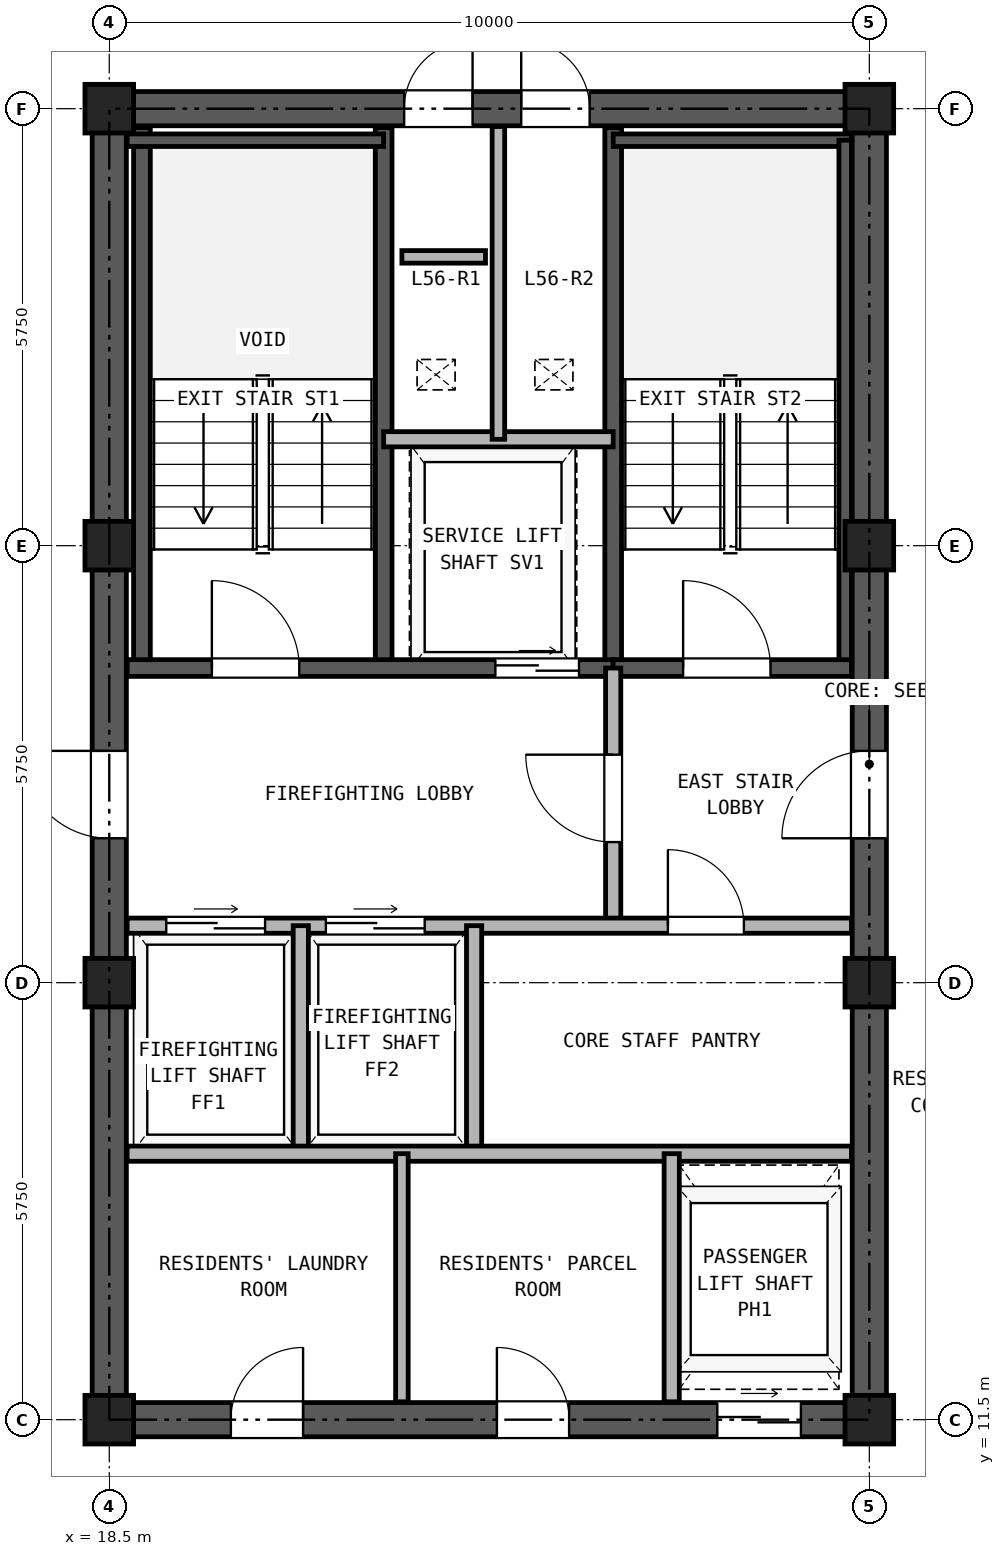
"""IFC4 building model, lengths in metres.
Left out: names, types, materials, properties, quantities, classifications, styles, units other than length and angle.
Written with IfcOpenShell. Run it as: python <this file> out.ifc"""

import sys

from ifc_helpers import new_model, si_unit, direction, frame, frame_2d, origin, origin_2d, place, context, subcontext, project, spatial, rectangle, hollow_rectangle, extrude, source, transform, mapped, element, fill, save


model = new_model("IFC4")
c1 = context("Model", 3, precision=1e-05, world=origin(), true_north=direction((0.0, 1.0)))
c2 = subcontext(c1, "Body", "Model", "MODEL_VIEW")
j1 = project(units=[si_unit("LENGTHUNIT", "METRE"), si_unit("PLANEANGLEUNIT", "RADIAN")], contexts=[c1])
p1 = place(None, origin())
s1 = spatial("IfcSite", under=j1, at=p1, CompositionType="ELEMENT")
p2 = place(p1, origin())
s2 = spatial("IfcBuilding", under=s1, at=p2, CompositionType="ELEMENT")
p3 = place(p2, frame((0.0, 0.0, 199.6)))
s3 = spatial("IfcBuildingStorey", under=s2, at=p3, CompositionType="ELEMENT", Elevation=199.6)
m1 = source(origin(), c2, "Body", "SweptSolid", [
    extrude(hollow_rectangle(XDim=0.64, YDim=0.64, WallThickness=0.035, at=origin_2d()), origin(), (0.0, 0.0, 1.0), 2.95),
])
for number, where, z_axis, x_axis in (
    (1, (18.5, 11.5, 0.0), (0.0, 0.0, 1.0), (1.0, 0.0, 0.0)),
    (2, (18.5, 17.25, 0.0), (0.0, 0.0, 1.0), (1.0, 0.0, 0.0)),
    (3, (18.5, 23.0, 0.0), (0.0, 0.0, 1.0), (1.0, 0.0, 0.0)),
    (4, (18.5, 28.75, 0.0), (0.0, 0.0, 1.0), (1.0, 0.0, 0.0)),
    (5, (28.5, 11.5, 0.0), (0.0, 0.0, 1.0), (1.0, 0.0, 0.0)),
    (6, (28.5, 17.25, 0.0), (0.0, 0.0, 1.0), (1.0, 0.0, 0.0)),
    (7, (28.5, 23.0, 0.0), (0.0, 0.0, 1.0), (1.0, 0.0, 0.0)),
    (8, (28.5, 28.75, 0.0), (0.0, 0.0, 1.0), (1.0, 0.0, 0.0)),
):
    element("IfcColumn", number, at=place(p3, frame(where, z_axis=z_axis, x_axis=x_axis)), inside=s3, PredefinedType="COLUMN", context=c2, shape_type="MappedRepresentation", body=[
        mapped(m1, transform((0.0, 0.0, 0.0), x_axis=(1.0, 0.0, 0.0), y_axis=(0.0, 1.0, 0.0), z_axis=(0.0, 0.0, 1.0), scale=1.0)),
    ])
p4 = place(p3, frame((18.275, 11.5, 0.0), z_axis=(0.0, 0.0, 1.0), x_axis=(1.0, 0.0, 0.0)))
e9 = element("IfcWall", 9, at=p4, inside=s3, PredefinedType="SHEAR", context=c2, shape_type="SweptSolid", body=[
    extrude(rectangle(XDim=10.45, YDim=0.45, at=frame_2d((5.225, 0.0))), origin(), (0.0, 0.0, 1.0), 2.95),
])
p5 = place(p4, frame((1.825, 0.0, 0.0)))
e10 = element("IfcOpeningElement", 10, at=p5, cuts=e9, PredefinedType="OPENING", context=c2, shape_type="SweptSolid", body=[
    extrude(rectangle(XDim=0.95, YDim=2.15, at=frame_2d((0.475, 1.075))), frame((0.0, 0.235, 0.0), z_axis=(0.0, -1.0, 0.0), x_axis=(1.0, 0.0, 0.0)), (0.0, 0.0, 1.0), 0.47),
])
p6 = place(p4, frame((5.325, 0.0, 0.0)))
e11 = element("IfcOpeningElement", 11, at=p6, cuts=e9, PredefinedType="OPENING", context=c2, shape_type="SweptSolid", body=[
    extrude(rectangle(XDim=0.95, YDim=2.15, at=frame_2d((0.475, 1.075))), frame((0.0, 0.235, 0.0), z_axis=(0.0, -1.0, 0.0), x_axis=(1.0, 0.0, 0.0)), (0.0, 0.0, 1.0), 0.47),
])
p7 = place(p4, frame((8.225, 0.0, 0.0)))
e12 = element("IfcOpeningElement", 12, at=p7, cuts=e9, PredefinedType="OPENING", context=c2, shape_type="SweptSolid", body=[
    extrude(rectangle(XDim=1.1, YDim=2.25, at=frame_2d((0.55, 1.125))), frame((0.0, 0.235, 0.0), z_axis=(0.0, -1.0, 0.0), x_axis=(1.0, 0.0, 0.0)), (0.0, 0.0, 1.0), 0.47),
])
p8 = place(p3, frame((18.275, 28.75, 0.0), z_axis=(0.0, 0.0, 1.0), x_axis=(1.0, 0.0, 0.0)))
e13 = element("IfcWall", 13, at=p8, inside=s3, PredefinedType="SHEAR", context=c2, shape_type="SweptSolid", body=[
    extrude(rectangle(XDim=10.45, YDim=0.45, at=frame_2d((5.225, 0.0))), origin(), (0.0, 0.0, 1.0), 2.95),
])
p9 = place(p8, frame((4.105, 0.0, 0.0)))
e14 = element("IfcOpeningElement", 14, at=p9, cuts=e13, PredefinedType="OPENING", context=c2, shape_type="SweptSolid", body=[
    extrude(rectangle(XDim=0.9, YDim=2.05, at=frame_2d((0.45, 1.025))), frame((0.0, 0.235, 0.0), z_axis=(0.0, -1.0, 0.0), x_axis=(1.0, 0.0, 0.0)), (0.0, 0.0, 1.0), 0.47),
])
p10 = place(p8, frame((5.645, 0.0, 0.0)))
e15 = element("IfcOpeningElement", 15, at=p10, cuts=e13, PredefinedType="OPENING", context=c2, shape_type="SweptSolid", body=[
    extrude(rectangle(XDim=0.9, YDim=2.05, at=frame_2d((0.45, 1.025))), frame((0.0, 0.235, 0.0), z_axis=(0.0, -1.0, 0.0), x_axis=(1.0, 0.0, 0.0)), (0.0, 0.0, 1.0), 0.47),
])
p11 = place(p3, frame((18.5, 11.725, 0.0), z_axis=(0.0, 0.0, 1.0), x_axis=(0.0, 1.0, 0.0)))
e16 = element("IfcWall", 16, at=p11, inside=s3, PredefinedType="SHEAR", context=c2, shape_type="SweptSolid", body=[
    extrude(rectangle(XDim=16.8, YDim=0.45, at=frame_2d((8.4, 0.0))), origin(), (0.0, 0.0, 1.0), 2.95),
])
p12 = place(p11, frame((7.425, 0.0, 0.0)))
e17 = element("IfcOpeningElement", 17, at=p12, cuts=e16, PredefinedType="OPENING", context=c2, shape_type="SweptSolid", body=[
    extrude(rectangle(XDim=1.15, YDim=2.2, at=frame_2d((0.575, 1.1))), frame((0.0, 0.235, 0.0), z_axis=(0.0, -1.0, 0.0), x_axis=(1.0, 0.0, 0.0)), (0.0, 0.0, 1.0), 0.47),
])
p13 = place(p3, frame((28.5, 11.725, 0.0), z_axis=(0.0, 0.0, 1.0), x_axis=(0.0, 1.0, 0.0)))
e18 = element("IfcWall", 18, at=p13, inside=s3, PredefinedType="SHEAR", context=c2, shape_type="SweptSolid", body=[
    extrude(rectangle(XDim=16.8, YDim=0.45, at=frame_2d((8.4, 0.0))), origin(), (0.0, 0.0, 1.0), 2.95),
])
p14 = place(p13, frame((7.425, 0.0, 0.0)))
e19 = element("IfcOpeningElement", 19, at=p14, cuts=e18, PredefinedType="OPENING", context=c2, shape_type="SweptSolid", body=[
    extrude(rectangle(XDim=1.15, YDim=2.2, at=frame_2d((0.575, 1.1))), frame((0.0, 0.235, 0.0), z_axis=(0.0, -1.0, 0.0), x_axis=(1.0, 0.0, 0.0)), (0.0, 0.0, 1.0), 0.47),
])
for number, where, z_axis, x_axis in (
    (20, (18.93, 21.39, 0.0), (0.0, 0.0, 1.0), (0.0, 1.0, 0.0)),
    (21, (22.11, 21.39, 0.0), (0.0, 0.0, 1.0), (0.0, 1.0, 0.0)),
    (22, (25.13, 21.39, 0.0), (0.0, 0.0, 1.0), (0.0, 1.0, 0.0)),
):
    element("IfcWall", number, at=place(p3, frame(where, z_axis=z_axis, x_axis=x_axis)), inside=s3, PredefinedType="SOLIDWALL", context=c2, shape_type="SweptSolid", body=[
        extrude(rectangle(XDim=7.11, YDim=0.22, at=frame_2d((3.555, 0.0))), origin(), (0.0, 0.0, 1.0), 2.95),
    ])
p15 = place(p3, frame((18.735, 28.335, 0.0), z_axis=(0.0, 0.0, 1.0), x_axis=(1.0, 0.0, 0.0)))
e23 = element("IfcWall", 23, at=p15, inside=s3, PredefinedType="PARTITIONING", context=c2, shape_type="SweptSolid", body=[
    extrude(rectangle(XDim=3.375, YDim=0.165, at=frame_2d((1.688, 0.0))), origin(), (0.0, 0.0, 1.0), 2.95),
])
p16 = place(p3, frame((25.13, 28.335, 0.0), z_axis=(0.0, 0.0, 1.0), x_axis=(1.0, 0.0, 0.0)))
e24 = element("IfcWall", 24, at=p16, inside=s3, PredefinedType="PARTITIONING", context=c2, shape_type="SweptSolid", body=[
    extrude(rectangle(XDim=3.135, YDim=0.165, at=frame_2d((1.567, 0.0))), origin(), (0.0, 0.0, 1.0), 2.95),
])
p17 = place(p3, frame((28.183, 21.39, 0.0), z_axis=(0.0, 0.0, 1.0), x_axis=(0.0, 1.0, 0.0)))
e25 = element("IfcWall", 25, at=p17, inside=s3, PredefinedType="PARTITIONING", context=c2, shape_type="SweptSolid", body=[
    extrude(rectangle(XDim=6.945, YDim=0.165, at=frame_2d((3.473, 0.0))), origin(), (0.0, 0.0, 1.0), 2.95),
])
p18 = place(p3, frame((18.735, 21.39, 0.0), z_axis=(0.0, 0.0, 1.0), x_axis=(1.0, 0.0, 0.0)))
e26 = element("IfcWall", 26, at=p18, inside=s3, PredefinedType="SOLIDWALL", context=c2, shape_type="SweptSolid", body=[
    extrude(rectangle(XDim=6.395, YDim=0.22, at=frame_2d((3.197, 0.0))), origin(), (0.0, 0.0, 1.0), 2.95),
])
p19 = place(p18, frame((1.115, 0.0, 0.0)))
e27 = element("IfcOpeningElement", 27, at=p19, cuts=e26, PredefinedType="OPENING", context=c2, shape_type="SweptSolid", body=[
    extrude(rectangle(XDim=1.15, YDim=2.2, at=frame_2d((0.575, 1.1))), frame((0.0, 0.12, 0.0), z_axis=(0.0, -1.0, 0.0), x_axis=(1.0, 0.0, 0.0)), (0.0, 0.0, 1.0), 0.24),
])
p20 = place(p18, frame((4.845, 0.0, 0.0)))
e28 = element("IfcOpeningElement", 28, at=p20, cuts=e26, PredefinedType="OPENING", context=c2, shape_type="SweptSolid", body=[
    extrude(rectangle(XDim=1.1, YDim=2.25, at=frame_2d((0.55, 1.125))), frame((0.0, 0.12, 0.0), z_axis=(0.0, -1.0, 0.0), x_axis=(1.0, 0.0, 0.0)), (0.0, 0.0, 1.0), 0.24),
])
p21 = place(p3, frame((25.13, 21.39, 0.0), z_axis=(0.0, 0.0, 1.0), x_axis=(1.0, 0.0, 0.0)))
e29 = element("IfcWall", 29, at=p21, inside=s3, PredefinedType="SOLIDWALL", context=c2, shape_type="SweptSolid", body=[
    extrude(rectangle(XDim=3.135, YDim=0.22, at=frame_2d((1.567, 0.0))), origin(), (0.0, 0.0, 1.0), 2.95),
])
p22 = place(p21, frame((0.92, 0.0, 0.0)))
e30 = element("IfcOpeningElement", 30, at=p22, cuts=e29, PredefinedType="OPENING", context=c2, shape_type="SweptSolid", body=[
    extrude(rectangle(XDim=1.15, YDim=2.2, at=frame_2d((0.575, 1.1))), frame((0.0, 0.12, 0.0), z_axis=(0.0, -1.0, 0.0), x_axis=(1.0, 0.0, 0.0)), (0.0, 0.0, 1.0), 0.24),
])
p23 = place(p3, frame((22.11, 24.4, 0.0), z_axis=(0.0, 0.0, 1.0), x_axis=(1.0, 0.0, 0.0)))
e31 = element("IfcWall", 31, at=p23, inside=s3, PredefinedType="PARTITIONING", context=c2, shape_type="SweptSolid", body=[
    extrude(rectangle(XDim=3.02, YDim=0.2, at=frame_2d((1.51, 0.0))), origin(), (0.0, 0.0, 1.0), 2.95),
])
p24 = place(p3, frame((23.62, 24.4, 0.0), z_axis=(0.0, 0.0, 1.0), x_axis=(0.0, 1.0, 0.0)))
e32 = element("IfcWall", 32, at=p24, inside=s3, PredefinedType="PARTITIONING", context=c2, shape_type="SweptSolid", body=[
    extrude(rectangle(XDim=4.115, YDim=0.165, at=frame_2d((2.058, 0.0))), origin(), (0.0, 0.0, 1.0), 2.95),
])
p25 = place(p3, frame((25.13, 18.0, 0.0), z_axis=(0.0, 0.0, 1.0), x_axis=(0.0, 1.0, 0.0)))
e33 = element("IfcWall", 33, at=p25, inside=s3, PredefinedType="PARTITIONING", context=c2, shape_type="SweptSolid", body=[
    extrude(rectangle(XDim=3.39, YDim=0.2, at=frame_2d((1.695, 0.0))), origin(), (0.0, 0.0, 1.0), 2.95),
])
p26 = place(p25, frame((1.1, 0.0, 0.0)))
e34 = element("IfcOpeningElement", 34, at=p26, cuts=e33, PredefinedType="OPENING", context=c2, shape_type="SweptSolid", body=[
    extrude(rectangle(XDim=1.15, YDim=2.2, at=frame_2d((0.575, 1.1))), frame((0.0, 0.11, 0.0), z_axis=(0.0, -1.0, 0.0), x_axis=(1.0, 0.0, 0.0)), (0.0, 0.0, 1.0), 0.22),
])
p27 = place(p3, frame((18.735, 18.0, 0.0), z_axis=(0.0, 0.0, 1.0), x_axis=(1.0, 0.0, 0.0)))
e35 = element("IfcWall", 35, at=p27, inside=s3, PredefinedType="PARTITIONING", context=c2, shape_type="SweptSolid", body=[
    extrude(rectangle(XDim=9.53, YDim=0.2, at=frame_2d((4.765, 0.0))), origin(), (0.0, 0.0, 1.0), 2.95),
])
p28 = place(p27, frame((0.515, 0.0, 0.0)))
e36 = element("IfcOpeningElement", 36, at=p28, cuts=e35, PredefinedType="OPENING", context=c2, shape_type="SweptSolid", body=[
    extrude(rectangle(XDim=1.3, YDim=2.3, at=frame_2d((0.65, 1.15))), frame((0.0, 0.11, 0.0), z_axis=(0.0, -1.0, 0.0), x_axis=(1.0, 0.0, 0.0)), (0.0, 0.0, 1.0), 0.22),
])
p29 = place(p27, frame((2.615, 0.0, 0.0)))
e37 = element("IfcOpeningElement", 37, at=p29, cuts=e35, PredefinedType="OPENING", context=c2, shape_type="SweptSolid", body=[
    extrude(rectangle(XDim=1.3, YDim=2.3, at=frame_2d((0.65, 1.15))), frame((0.0, 0.11, 0.0), z_axis=(0.0, -1.0, 0.0), x_axis=(1.0, 0.0, 0.0)), (0.0, 0.0, 1.0), 0.22),
])
p30 = place(p27, frame((7.115, 0.0, 0.0)))
e38 = element("IfcOpeningElement", 38, at=p30, cuts=e35, PredefinedType="OPENING", context=c2, shape_type="SweptSolid", body=[
    extrude(rectangle(XDim=1.0, YDim=2.15, at=frame_2d((0.5, 1.075))), frame((0.0, 0.11, 0.0), z_axis=(0.0, -1.0, 0.0), x_axis=(1.0, 0.0, 0.0)), (0.0, 0.0, 1.0), 0.22),
])
for number, where, z_axis, x_axis in (
    (39, (21.02, 15.0, 0.0), (0.0, 0.0, 1.0), (0.0, 1.0, 0.0)),
    (40, (23.3, 15.0, 0.0), (0.0, 0.0, 1.0), (0.0, 1.0, 0.0)),
):
    element("IfcWall", number, at=place(p3, frame(where, z_axis=z_axis, x_axis=x_axis)), inside=s3, PredefinedType="PARTITIONING", context=c2, shape_type="SweptSolid", body=[
        extrude(rectangle(XDim=3.0, YDim=0.2, at=frame_2d((1.5, 0.0))), origin(), (0.0, 0.0, 1.0), 2.95),
    ])
p31 = place(p3, frame((18.735, 15.0, 0.0), z_axis=(0.0, 0.0, 1.0), x_axis=(1.0, 0.0, 0.0)))
e41 = element("IfcWall", 41, at=p31, inside=s3, PredefinedType="PARTITIONING", context=c2, shape_type="SweptSolid", body=[
    extrude(rectangle(XDim=9.53, YDim=0.2, at=frame_2d((4.765, 0.0))), origin(), (0.0, 0.0, 1.0), 2.95),
])
p32 = place(p3, frame((22.35, 11.735, 0.0), z_axis=(0.0, 0.0, 1.0), x_axis=(0.0, 1.0, 0.0)))
e42 = element("IfcWall", 42, at=p32, inside=s3, PredefinedType="PARTITIONING", context=c2, shape_type="SweptSolid", body=[
    extrude(rectangle(XDim=3.265, YDim=0.165, at=frame_2d((1.632, 0.0))), origin(), (0.0, 0.0, 1.0), 2.95),
])
p33 = place(p3, frame((25.9, 11.735, 0.0), z_axis=(0.0, 0.0, 1.0), x_axis=(0.0, 1.0, 0.0)))
e43 = element("IfcWall", 43, at=p33, inside=s3, PredefinedType="PARTITIONING", context=c2, shape_type="SweptSolid", body=[
    extrude(rectangle(XDim=3.265, YDim=0.2, at=frame_2d((1.632, 0.0))), origin(), (0.0, 0.0, 1.0), 2.95),
])
p34 = place(p3, frame((22.35, 26.8, 0.0), z_axis=(0.0, 0.0, 1.0), x_axis=(1.0, 0.0, 0.0)))
e44 = element("IfcWall", 44, at=p34, inside=s3, PredefinedType="PARTITIONING", context=c2, shape_type="SweptSolid", body=[
    extrude(rectangle(XDim=1.1, YDim=0.165, at=frame_2d((0.55, 0.0))), origin(), (0.0, 0.0, 1.0), 2.95),
])
p35 = place(p19, frame((1.15, 0.0, 0.0), z_axis=(0.0, 0.0, 1.0), x_axis=(-1.0, 0.0, 0.0)))
e45 = element("IfcDoor", 45, at=p35, inside=s3, OperationType="SINGLE_SWING_LEFT", PredefinedType="DOOR", context=c2, shape_type="SweptSolid", body=[
    extrude(rectangle(XDim=1.15, YDim=2.2, at=frame_2d((0.575, 1.1))), frame((0.0, 0.025, 0.0), z_axis=(0.0, -1.0, 0.0), x_axis=(1.0, 0.0, 0.0)), (0.0, 0.0, 1.0), 0.05),
])
fill(e27, e45)
p36 = place(p22, frame((1.15, 0.0, 0.0), z_axis=(0.0, 0.0, 1.0), x_axis=(-1.0, 0.0, 0.0)))
e46 = element("IfcDoor", 46, at=p36, inside=s3, OperationType="SINGLE_SWING_LEFT", PredefinedType="DOOR", context=c2, shape_type="SweptSolid", body=[
    extrude(rectangle(XDim=1.15, YDim=2.2, at=frame_2d((0.575, 1.1))), frame((0.0, 0.025, 0.0), z_axis=(0.0, -1.0, 0.0), x_axis=(1.0, 0.0, 0.0)), (0.0, 0.0, 1.0), 0.05),
])
fill(e30, e46)
p37 = place(p20, frame((1.1, 0.0, 0.0), z_axis=(0.0, 0.0, 1.0), x_axis=(-1.0, 0.0, 0.0)))
e47 = element("IfcDoor", 47, at=p37, inside=s3, OperationType="DOUBLE_DOOR_SLIDING", PredefinedType="DOOR", context=c2, shape_type="SweptSolid", body=[
    extrude(rectangle(XDim=1.1, YDim=2.25, at=frame_2d((0.55, 1.125))), frame((0.0, 0.025, 0.0), z_axis=(0.0, -1.0, 0.0), x_axis=(1.0, 0.0, 0.0)), (0.0, 0.0, 1.0), 0.05),
])
fill(e28, e47)
p38 = place(p26, origin())
e48 = element("IfcDoor", 48, at=p38, inside=s3, OperationType="SINGLE_SWING_RIGHT", PredefinedType="DOOR", context=c2, shape_type="SweptSolid", body=[
    extrude(rectangle(XDim=1.15, YDim=2.2, at=frame_2d((0.575, 1.1))), frame((0.0, 0.025, 0.0), z_axis=(0.0, -1.0, 0.0), x_axis=(1.0, 0.0, 0.0)), (0.0, 0.0, 1.0), 0.05),
])
fill(e34, e48)
p39 = place(p28, origin())
e49 = element("IfcDoor", 49, at=p39, inside=s3, OperationType="DOUBLE_DOOR_SLIDING", PredefinedType="DOOR", context=c2, shape_type="SweptSolid", body=[
    extrude(rectangle(XDim=1.3, YDim=2.3, at=frame_2d((0.65, 1.15))), frame((0.0, 0.025, 0.0), z_axis=(0.0, -1.0, 0.0), x_axis=(1.0, 0.0, 0.0)), (0.0, 0.0, 1.0), 0.05),
])
fill(e36, e49)
p40 = place(p29, origin())
e50 = element("IfcDoor", 50, at=p40, inside=s3, OperationType="DOUBLE_DOOR_SLIDING", PredefinedType="DOOR", context=c2, shape_type="SweptSolid", body=[
    extrude(rectangle(XDim=1.3, YDim=2.3, at=frame_2d((0.65, 1.15))), frame((0.0, 0.025, 0.0), z_axis=(0.0, -1.0, 0.0), x_axis=(1.0, 0.0, 0.0)), (0.0, 0.0, 1.0), 0.05),
])
fill(e37, e50)
p41 = place(p30, frame((1.0, 0.0, 0.0), z_axis=(0.0, 0.0, 1.0), x_axis=(-1.0, 0.0, 0.0)))
e51 = element("IfcDoor", 51, at=p41, inside=s3, OperationType="SINGLE_SWING_LEFT", PredefinedType="DOOR", context=c2, shape_type="SweptSolid", body=[
    extrude(rectangle(XDim=1.0, YDim=2.15, at=frame_2d((0.5, 1.075))), frame((0.0, 0.025, 0.0), z_axis=(0.0, -1.0, 0.0), x_axis=(1.0, 0.0, 0.0)), (0.0, 0.0, 1.0), 0.05),
])
fill(e38, e51)
p42 = place(p12, frame((1.15, 0.0, 0.0), z_axis=(0.0, 0.0, 1.0), x_axis=(-1.0, 0.0, 0.0)))
e52 = element("IfcDoor", 52, at=p42, inside=s3, OperationType="SINGLE_SWING_RIGHT", PredefinedType="DOOR", context=c2, shape_type="SweptSolid", body=[
    extrude(rectangle(XDim=1.15, YDim=2.2, at=frame_2d((0.575, 1.1))), frame((0.0, 0.025, 0.0), z_axis=(0.0, -1.0, 0.0), x_axis=(1.0, 0.0, 0.0)), (0.0, 0.0, 1.0), 0.05),
])
fill(e17, e52)
p43 = place(p14, origin())
e53 = element("IfcDoor", 53, at=p43, inside=s3, OperationType="SINGLE_SWING_LEFT", PredefinedType="DOOR", context=c2, shape_type="SweptSolid", body=[
    extrude(rectangle(XDim=1.15, YDim=2.2, at=frame_2d((0.575, 1.1))), frame((0.0, 0.025, 0.0), z_axis=(0.0, -1.0, 0.0), x_axis=(1.0, 0.0, 0.0)), (0.0, 0.0, 1.0), 0.05),
])
fill(e19, e53)
p44 = place(p9, origin())
e54 = element("IfcDoor", 54, at=p44, inside=s3, OperationType="SINGLE_SWING_RIGHT", PredefinedType="DOOR", context=c2, shape_type="SweptSolid", body=[
    extrude(rectangle(XDim=0.9, YDim=2.05, at=frame_2d((0.45, 1.025))), frame((0.0, 0.025, 0.0), z_axis=(0.0, -1.0, 0.0), x_axis=(1.0, 0.0, 0.0)), (0.0, 0.0, 1.0), 0.05),
])
fill(e14, e54)
p45 = place(p10, origin())
e55 = element("IfcDoor", 55, at=p45, inside=s3, OperationType="SINGLE_SWING_LEFT", PredefinedType="DOOR", context=c2, shape_type="SweptSolid", body=[
    extrude(rectangle(XDim=0.9, YDim=2.05, at=frame_2d((0.45, 1.025))), frame((0.0, 0.025, 0.0), z_axis=(0.0, -1.0, 0.0), x_axis=(1.0, 0.0, 0.0)), (0.0, 0.0, 1.0), 0.05),
])
fill(e15, e55)
p46 = place(p5, frame((0.95, 0.0, 0.0), z_axis=(0.0, 0.0, 1.0), x_axis=(-1.0, 0.0, 0.0)))
e56 = element("IfcDoor", 56, at=p46, inside=s3, OperationType="SINGLE_SWING_RIGHT", PredefinedType="DOOR", context=c2, shape_type="SweptSolid", body=[
    extrude(rectangle(XDim=0.95, YDim=2.15, at=frame_2d((0.475, 1.075))), frame((0.0, 0.025, 0.0), z_axis=(0.0, -1.0, 0.0), x_axis=(1.0, 0.0, 0.0)), (0.0, 0.0, 1.0), 0.05),
])
fill(e10, e56)
p47 = place(p6, frame((0.95, 0.0, 0.0), z_axis=(0.0, 0.0, 1.0), x_axis=(-1.0, 0.0, 0.0)))
e57 = element("IfcDoor", 57, at=p47, inside=s3, OperationType="SINGLE_SWING_LEFT", PredefinedType="DOOR", context=c2, shape_type="SweptSolid", body=[
    extrude(rectangle(XDim=0.95, YDim=2.15, at=frame_2d((0.475, 1.075))), frame((0.0, 0.025, 0.0), z_axis=(0.0, -1.0, 0.0), x_axis=(1.0, 0.0, 0.0)), (0.0, 0.0, 1.0), 0.05),
])
fill(e11, e57)
p48 = place(p7, frame((1.1, 0.0, 0.0), z_axis=(0.0, 0.0, 1.0), x_axis=(-1.0, 0.0, 0.0)))
e58 = element("IfcDoor", 58, at=p48, inside=s3, OperationType="DOUBLE_DOOR_SLIDING", PredefinedType="DOOR", context=c2, shape_type="SweptSolid", body=[
    extrude(rectangle(XDim=1.1, YDim=2.25, at=frame_2d((0.55, 1.125))), frame((0.0, 0.025, 0.0), z_axis=(0.0, -1.0, 0.0), x_axis=(1.0, 0.0, 0.0)), (0.0, 0.0, 1.0), 0.05),
])
fill(e12, e58)
save(model, sys.argv[1])
